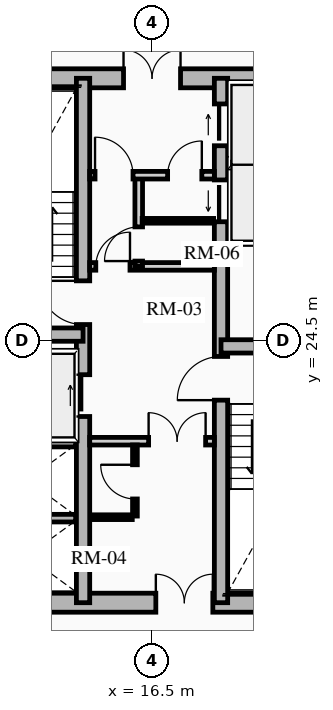
"""IFC4 building model, lengths in metres.
Left out: names, types, materials, properties, quantities, classifications, styles, units other than length and angle.
Written with IfcOpenShell. Run it as: python <this file> out.ifc"""

import sys

from ifc_helpers import new_model, si_unit, direction, frame, frame_2d, origin, place, context, subcontext, project, spatial, rectangle, extrude, source, transform, mapped, element, fill, save


model = new_model("IFC4")
c1 = context("Model", 3, precision=1e-05, world=origin(), true_north=direction((0.0, 1.0)))
c2 = subcontext(c1, "Body", "Model", "MODEL_VIEW")
j1 = project(units=[si_unit("LENGTHUNIT", "METRE"), si_unit("PLANEANGLEUNIT", "RADIAN")], contexts=[c1])
p1 = place(None, origin())
s1 = spatial("IfcSite", under=j1, at=p1, CompositionType="ELEMENT")
p2 = place(p1, origin())
s2 = spatial("IfcBuilding", under=s1, at=p2, CompositionType="ELEMENT")
p3 = place(p2, frame((0.0, 0.0, 33.64)))
s3 = spatial("IfcBuildingStorey", under=s2, at=p3, CompositionType="ELEMENT", Elevation=33.64)
p4 = place(p3, frame((11.15, 17.6, 0.0), z_axis=(0.0, 0.0, 1.0), x_axis=(1.0, 0.0, 0.0)))
e1 = element("IfcWall", 1, at=p4, inside=s3, PredefinedType="SHEAR", context=c2, shape_type="SweptSolid", body=[
    extrude(rectangle(XDim=10.7, YDim=0.5, at=frame_2d((5.35, 0.0))), origin(), (0.0, 0.0, 1.0), 2.91),
])
m1 = source(origin(), c2, "Body", "SweptSolid", [
    extrude(rectangle(XDim=1.5, YDim=2.02, at=frame_2d((0.75, 1.01))), frame((0.0, 0.26, 0.0), z_axis=(0.0, -1.0, 0.0), x_axis=(1.0, 0.0, 0.0)), (0.0, 0.0, 1.0), 0.52),
])
p5 = place(p4, frame((5.45, 0.0, 0.0)))
e2 = element("IfcOpeningElement", 2, at=p5, cuts=e1, PredefinedType="OPENING", context=c2, shape_type="MappedRepresentation", body=[
    mapped(m1, transform((0.0, 0.0, 0.0), x_axis=(1.0, 0.0, 0.0), y_axis=(0.0, 1.0, 0.0), z_axis=(0.0, 0.0, 1.0), scale=1.0)),
])
p6 = place(p3, frame((11.15, 31.4, 0.0), z_axis=(0.0, 0.0, 1.0), x_axis=(1.0, 0.0, 0.0)))
e3 = element("IfcWall", 3, at=p6, inside=s3, PredefinedType="SHEAR", context=c2, shape_type="SweptSolid", body=[
    extrude(rectangle(XDim=10.7, YDim=0.5, at=frame_2d((5.35, 0.0))), origin(), (0.0, 0.0, 1.0), 2.91),
])
p7 = place(p6, frame((4.6, 0.0, 0.0)))
e4 = element("IfcOpeningElement", 4, at=p7, cuts=e3, PredefinedType="OPENING", context=c2, shape_type="MappedRepresentation", body=[
    mapped(m1, transform((0.0, 0.0, 0.0), x_axis=(1.0, 0.0, 0.0), y_axis=(0.0, 1.0, 0.0), z_axis=(0.0, 0.0, 1.0), scale=1.0)),
])
p8 = place(p3, frame((14.685, 17.6, 0.0), z_axis=(0.0, 0.0, 1.0), x_axis=(0.0, 1.0, 0.0)))
e5 = element("IfcWall", 5, at=p8, inside=s3, PredefinedType="SHEAR", context=c2, shape_type="SweptSolid", body=[
    extrude(rectangle(XDim=13.8, YDim=0.35, at=frame_2d((6.9, 0.0))), origin(), (0.0, 0.0, 1.0), 2.91),
])
m2 = source(origin(), c2, "Body", "SweptSolid", [
    extrude(rectangle(XDim=1.1, YDim=2.015, at=frame_2d((0.55, 1.007))), frame((0.0, 0.185, 0.0), z_axis=(0.0, -1.0, 0.0), x_axis=(1.0, 0.0, 0.0)), (0.0, 0.0, 1.0), 0.37),
])
p9 = place(p8, frame((4.9, 0.0, 0.0)))
e6 = element("IfcOpeningElement", 6, at=p9, cuts=e5, PredefinedType="OPENING", context=c2, shape_type="MappedRepresentation", body=[
    mapped(m2, transform((0.0, 0.0, 0.0), x_axis=(1.0, 0.0, 0.0), y_axis=(0.0, 1.0, 0.0), z_axis=(0.0, 0.0, 1.0), scale=1.0)),
])
m3 = source(origin(), c2, "Body", "SweptSolid", [
    extrude(rectangle(XDim=1.15, YDim=2.02, at=frame_2d((0.575, 1.01))), frame((0.0, 0.185, 0.0), z_axis=(0.0, -1.0, 0.0), x_axis=(1.0, 0.0, 0.0)), (0.0, 0.0, 1.0), 0.37),
])
p10 = place(p8, frame((7.32, 0.0, 0.0)))
e7 = element("IfcOpeningElement", 7, at=p10, cuts=e5, PredefinedType="OPENING", context=c2, shape_type="MappedRepresentation", body=[
    mapped(m3, transform((0.0, 0.0, 0.0), x_axis=(1.0, 0.0, 0.0), y_axis=(0.0, 1.0, 0.0), z_axis=(0.0, 0.0, 1.0), scale=1.0)),
])
p11 = place(p3, frame((18.315, 17.6, 0.0), z_axis=(0.0, 0.0, 1.0), x_axis=(0.0, 1.0, 0.0)))
e8 = element("IfcWall", 8, at=p11, inside=s3, PredefinedType="SHEAR", context=c2, shape_type="SweptSolid", body=[
    extrude(rectangle(XDim=13.8, YDim=0.35, at=frame_2d((6.9, 0.0))), origin(), (0.0, 0.0, 1.0), 2.91),
])
p12 = place(p11, frame((10.025, 0.0, 0.0)))
e9 = element("IfcOpeningElement", 9, at=p12, cuts=e8, PredefinedType="OPENING", context=c2, shape_type="MappedRepresentation", body=[
    mapped(m2, transform((0.0, 0.0, 0.0), x_axis=(1.0, 0.0, 0.0), y_axis=(0.0, 1.0, 0.0), z_axis=(0.0, 0.0, 1.0), scale=1.0)),
])
p13 = place(p11, frame((12.025, 0.0, 0.0)))
e10 = element("IfcOpeningElement", 10, at=p13, cuts=e8, PredefinedType="OPENING", context=c2, shape_type="MappedRepresentation", body=[
    mapped(m2, transform((0.0, 0.0, 0.0), x_axis=(1.0, 0.0, 0.0), y_axis=(0.0, 1.0, 0.0), z_axis=(0.0, 0.0, 1.0), scale=1.0)),
])
p14 = place(p11, frame((5.33, 0.0, 0.0)))
e11 = element("IfcOpeningElement", 11, at=p14, cuts=e8, PredefinedType="OPENING", context=c2, shape_type="MappedRepresentation", body=[
    mapped(m3, transform((0.0, 0.0, 0.0), x_axis=(1.0, 0.0, 0.0), y_axis=(0.0, 1.0, 0.0), z_axis=(0.0, 0.0, 1.0), scale=1.0)),
])
for number, where, z_axis, x_axis in (
    (12, (11.4, 24.655, 0.0), (0.0, 0.0, 1.0), (1.0, 0.0, 0.0)),
    (13, (18.315, 24.345, 0.0), (0.0, 0.0, 1.0), (1.0, 0.0, 0.0)),
):
    element("IfcWall", number, at=place(p3, frame(where, z_axis=z_axis, x_axis=x_axis)), inside=s3, PredefinedType="SHEAR", context=c2, shape_type="SweptSolid", body=[
        extrude(rectangle(XDim=3.285, YDim=0.35, at=frame_2d((1.643, 0.0))), origin(), (0.0, 0.0, 1.0), 2.91),
    ])
for number, where, z_axis, x_axis in (
    (14, (11.52, 21.8, 0.0), (0.0, 0.0, 1.0), (1.0, 0.0, 0.0)),
    (15, (11.52, 19.825, 0.0), (0.0, 0.0, 1.0), (1.0, 0.0, 0.0)),
    (16, (18.51, 27.13, 0.0), (0.0, 0.0, 1.0), (1.0, 0.0, 0.0)),
    (17, (18.51, 29.175, 0.0), (0.0, 0.0, 1.0), (1.0, 0.0, 0.0)),
):
    element("IfcWall", number, at=place(p3, frame(where, z_axis=z_axis, x_axis=x_axis)), inside=s3, PredefinedType="SHEAR", context=c2, shape_type="SweptSolid", body=[
        extrude(rectangle(XDim=2.97, YDim=0.2, at=frame_2d((1.485, 0.0))), origin(), (0.0, 0.0, 1.0), 2.91),
    ])
p15 = place(p3, frame((14.86, 21.85, 0.0), z_axis=(0.0, 0.0, 1.0), x_axis=(1.0, 0.0, 0.0)))
e18 = element("IfcWall", 18, at=p15, inside=s3, PredefinedType="PARTITIONING", context=c2, shape_type="SweptSolid", body=[
    extrude(rectangle(XDim=3.28, YDim=0.2, at=frame_2d((1.64, 0.0))), origin(), (0.0, 0.0, 1.0), 2.635),
])
m4 = source(origin(), c2, "Body", "SweptSolid", [
    extrude(rectangle(XDim=1.5, YDim=2.02, at=frame_2d((0.75, 1.01))), frame((0.0, 0.11, 0.0), z_axis=(0.0, -1.0, 0.0), x_axis=(1.0, 0.0, 0.0)), (0.0, 0.0, 1.0), 0.22),
])
p16 = place(p15, frame((1.55, 0.0, 0.0)))
e19 = element("IfcOpeningElement", 19, at=p16, cuts=e18, PredefinedType="OPENING", context=c2, shape_type="MappedRepresentation", body=[
    mapped(m4, transform((0.0, 0.0, 0.0), x_axis=(1.0, 0.0, 0.0), y_axis=(0.0, 1.0, 0.0), z_axis=(0.0, 0.0, 1.0), scale=1.0)),
])
p17 = place(p3, frame((14.86, 26.45, 0.0), z_axis=(0.0, 0.0, 1.0), x_axis=(1.0, 0.0, 0.0)))
e20 = element("IfcWall", 20, at=p17, inside=s3, PredefinedType="PARTITIONING", context=c2, shape_type="SweptSolid", body=[
    extrude(rectangle(XDim=3.28, YDim=0.2, at=frame_2d((1.64, 0.0))), origin(), (0.0, 0.0, 1.0), 2.635),
])
m5 = source(origin(), c2, "Body", "SweptSolid", [
    extrude(rectangle(XDim=0.9, YDim=2.005, at=frame_2d((0.45, 1.002))), frame((0.0, 0.11, 0.0), z_axis=(0.0, -1.0, 0.0), x_axis=(1.0, 0.0, 0.0)), (0.0, 0.0, 1.0), 0.22),
])
p18 = place(p17, frame((0.16, 0.0, 0.0)))
e21 = element("IfcOpeningElement", 21, at=p18, cuts=e20, PredefinedType="OPENING", context=c2, shape_type="MappedRepresentation", body=[
    mapped(m5, transform((0.0, 0.0, 0.0), x_axis=(1.0, 0.0, 0.0), y_axis=(0.0, 1.0, 0.0), z_axis=(0.0, 0.0, 1.0), scale=1.0)),
])
p19 = place(p3, frame((16.15, 26.45, 0.0), z_axis=(0.0, 0.0, 1.0), x_axis=(0.0, 1.0, 0.0)))
e22 = element("IfcWall", 22, at=p19, inside=s3, PredefinedType="PARTITIONING", context=c2, shape_type="SweptSolid", body=[
    extrude(rectangle(XDim=2.4, YDim=0.2, at=frame_2d((1.2, 0.0))), origin(), (0.0, 0.0, 1.0), 2.635),
])
p20 = place(p19, frame((0.14, 0.0, 0.0)))
e23 = element("IfcOpeningElement", 23, at=p20, cuts=e22, PredefinedType="OPENING", context=c2, shape_type="MappedRepresentation", body=[
    mapped(m5, transform((0.0, 0.0, 0.0), x_axis=(1.0, 0.0, 0.0), y_axis=(0.0, 1.0, 0.0), z_axis=(0.0, 0.0, 1.0), scale=1.0)),
])
p21 = place(p3, frame((14.86, 28.85, 0.0), z_axis=(0.0, 0.0, 1.0), x_axis=(1.0, 0.0, 0.0)))
e24 = element("IfcWall", 24, at=p21, inside=s3, PredefinedType="PARTITIONING", context=c2, shape_type="SweptSolid", body=[
    extrude(rectangle(XDim=3.28, YDim=0.2, at=frame_2d((1.64, 0.0))), origin(), (0.0, 0.0, 1.0), 2.635),
])
m6 = source(origin(), c2, "Body", "SweptSolid", [
    extrude(rectangle(XDim=1.0, YDim=2.015, at=frame_2d((0.5, 1.007))), frame((0.0, 0.11, 0.0), z_axis=(0.0, -1.0, 0.0), x_axis=(1.0, 0.0, 0.0)), (0.0, 0.0, 1.0), 0.22),
])
p22 = place(p21, frame((0.14, 0.0, 0.0)))
e25 = element("IfcOpeningElement", 25, at=p22, cuts=e24, PredefinedType="OPENING", context=c2, shape_type="MappedRepresentation", body=[
    mapped(m6, transform((0.0, 0.0, 0.0), x_axis=(1.0, 0.0, 0.0), y_axis=(0.0, 1.0, 0.0), z_axis=(0.0, 0.0, 1.0), scale=1.0)),
])
p23 = place(p21, frame((2.05, 0.0, 0.0)))
e26 = element("IfcOpeningElement", 26, at=p23, cuts=e24, PredefinedType="OPENING", context=c2, shape_type="MappedRepresentation", body=[
    mapped(m5, transform((0.0, 0.0, 0.0), x_axis=(1.0, 0.0, 0.0), y_axis=(0.0, 1.0, 0.0), z_axis=(0.0, 0.0, 1.0), scale=1.0)),
])
p24 = place(p3, frame((16.05, 19.88, 0.0), z_axis=(0.0, 0.0, 1.0), x_axis=(0.0, 1.0, 0.0)))
e27 = element("IfcWall", 27, at=p24, inside=s3, PredefinedType="PARTITIONING", context=c2, shape_type="SweptSolid", body=[
    extrude(rectangle(XDim=1.87, YDim=0.125, at=frame_2d((0.935, 0.0))), origin(), (0.0, 0.0, 1.0), 2.635),
])
m7 = source(origin(), c2, "Body", "SweptSolid", [
    extrude(rectangle(XDim=0.9, YDim=2.005, at=frame_2d((0.45, 1.002))), frame((0.0, 0.073, 0.0), z_axis=(0.0, -1.0, 0.0), x_axis=(1.0, 0.0, 0.0)), (0.0, 0.0, 1.0), 0.145),
])
p25 = place(p24, frame((0.45, 0.0, 0.0)))
e28 = element("IfcOpeningElement", 28, at=p25, cuts=e27, PredefinedType="OPENING", context=c2, shape_type="MappedRepresentation", body=[
    mapped(m7, transform((0.0, 0.0, 0.0), x_axis=(1.0, 0.0, 0.0), y_axis=(0.0, 1.0, 0.0), z_axis=(0.0, 0.0, 1.0), scale=1.0)),
])
p26 = place(p3, frame((14.88, 19.85, 0.0), z_axis=(0.0, 0.0, 1.0), x_axis=(1.0, 0.0, 0.0)))
e29 = element("IfcWall", 29, at=p26, inside=s3, PredefinedType="PARTITIONING", context=c2, shape_type="SweptSolid", body=[
    extrude(rectangle(XDim=1.1, YDim=0.125, at=frame_2d((0.55, 0.0))), origin(), (0.0, 0.0, 1.0), 2.635),
])
p27 = place(p3, frame((16.24, 27.65, 0.0), z_axis=(0.0, 0.0, 1.0), x_axis=(1.0, 0.0, 0.0)))
e30 = element("IfcWall", 30, at=p27, inside=s3, PredefinedType="PARTITIONING", context=c2, shape_type="SweptSolid", body=[
    extrude(rectangle(XDim=1.88, YDim=0.125, at=frame_2d((0.94, 0.0))), origin(), (0.0, 0.0, 1.0), 2.635),
])
m8 = source(origin(), c2, "Body", "SweptSolid", [
    extrude(rectangle(XDim=1.1, YDim=2.015, at=frame_2d((0.55, 1.007))), frame((0.0, 0.025, 0.0), z_axis=(0.0, -1.0, 0.0), x_axis=(1.0, 0.0, 0.0)), (0.0, 0.0, 1.0), 0.05),
])
p28 = place(p9, origin())
e31 = element("IfcDoor", 31, at=p28, inside=s3, OperationType="SLIDING_TO_RIGHT", PredefinedType="DOOR", context=c2, shape_type="MappedRepresentation", body=[
    mapped(m8, transform((0.0, 0.0, 0.0), x_axis=(1.0, 0.0, 0.0), y_axis=(0.0, 1.0, 0.0), z_axis=(0.0, 0.0, 1.0), scale=1.0)),
])
fill(e6, e31)
p29 = place(p12, origin())
e32 = element("IfcDoor", 32, at=p29, inside=s3, OperationType="SLIDING_TO_LEFT", PredefinedType="DOOR", context=c2, shape_type="MappedRepresentation", body=[
    mapped(m8, transform((0.0, 0.0, 0.0), x_axis=(1.0, 0.0, 0.0), y_axis=(0.0, 1.0, 0.0), z_axis=(0.0, 0.0, 1.0), scale=1.0)),
])
fill(e9, e32)
p30 = place(p13, origin())
e33 = element("IfcDoor", 33, at=p30, inside=s3, OperationType="SLIDING_TO_RIGHT", PredefinedType="DOOR", context=c2, shape_type="MappedRepresentation", body=[
    mapped(m8, transform((0.0, 0.0, 0.0), x_axis=(1.0, 0.0, 0.0), y_axis=(0.0, 1.0, 0.0), z_axis=(0.0, 0.0, 1.0), scale=1.0)),
])
fill(e10, e33)
m9 = source(origin(), c2, "Body", "SweptSolid", [
    extrude(rectangle(XDim=1.15, YDim=2.02, at=frame_2d((0.575, 1.01))), frame((0.0, 0.025, 0.0), z_axis=(0.0, -1.0, 0.0), x_axis=(1.0, 0.0, 0.0)), (0.0, 0.0, 1.0), 0.05),
])
p31 = place(p10, origin())
e34 = element("IfcDoor", 34, at=p31, inside=s3, OperationType="SINGLE_SWING_RIGHT", PredefinedType="DOOR", context=c2, shape_type="MappedRepresentation", body=[
    mapped(m9, transform((0.0, 0.0, 0.0), x_axis=(1.0, 0.0, 0.0), y_axis=(0.0, 1.0, 0.0), z_axis=(0.0, 0.0, 1.0), scale=1.0)),
])
fill(e7, e34)
p32 = place(p14, origin())
e35 = element("IfcDoor", 35, at=p32, inside=s3, OperationType="SINGLE_SWING_LEFT", PredefinedType="DOOR", context=c2, shape_type="MappedRepresentation", body=[
    mapped(m9, transform((0.0, 0.0, 0.0), x_axis=(1.0, 0.0, 0.0), y_axis=(0.0, 1.0, 0.0), z_axis=(0.0, 0.0, 1.0), scale=1.0)),
])
fill(e11, e35)
m10 = source(origin(), c2, "Body", "SweptSolid", [
    extrude(rectangle(XDim=1.5, YDim=2.02, at=frame_2d((0.75, 1.01))), frame((0.0, 0.025, 0.0), z_axis=(0.0, -1.0, 0.0), x_axis=(1.0, 0.0, 0.0)), (0.0, 0.0, 1.0), 0.05),
])
p33 = place(p7, origin())
e36 = element("IfcDoor", 36, at=p33, inside=s3, OperationType="DOUBLE_DOOR_SINGLE_SWING", PredefinedType="DOOR", context=c2, shape_type="MappedRepresentation", body=[
    mapped(m10, transform((0.0, 0.0, 0.0), x_axis=(1.0, 0.0, 0.0), y_axis=(0.0, 1.0, 0.0), z_axis=(0.0, 0.0, 1.0), scale=1.0)),
])
fill(e4, e36)
p34 = place(p5, origin())
e37 = element("IfcDoor", 37, at=p34, inside=s3, OperationType="DOUBLE_DOOR_SINGLE_SWING", PredefinedType="DOOR", context=c2, shape_type="MappedRepresentation", body=[
    mapped(m10, transform((0.0, 0.0, 0.0), x_axis=(1.0, 0.0, 0.0), y_axis=(0.0, 1.0, 0.0), z_axis=(0.0, 0.0, 1.0), scale=1.0)),
])
fill(e2, e37)
p35 = place(p16, origin())
e38 = element("IfcDoor", 38, at=p35, inside=s3, OperationType="DOUBLE_DOOR_SINGLE_SWING", PredefinedType="DOOR", context=c2, shape_type="MappedRepresentation", body=[
    mapped(m10, transform((0.0, 0.0, 0.0), x_axis=(1.0, 0.0, 0.0), y_axis=(0.0, 1.0, 0.0), z_axis=(0.0, 0.0, 1.0), scale=1.0)),
])
fill(e19, e38)
m11 = source(origin(), c2, "Body", "SweptSolid", [
    extrude(rectangle(XDim=0.9, YDim=2.005, at=frame_2d((0.45, 1.002))), frame((0.0, 0.025, 0.0), z_axis=(0.0, -1.0, 0.0), x_axis=(1.0, 0.0, 0.0)), (0.0, 0.0, 1.0), 0.05),
])
p36 = place(p18, origin())
e39 = element("IfcDoor", 39, at=p36, inside=s3, OperationType="SINGLE_SWING_RIGHT", PredefinedType="DOOR", context=c2, shape_type="MappedRepresentation", body=[
    mapped(m11, transform((0.0, 0.0, 0.0), x_axis=(1.0, 0.0, 0.0), y_axis=(0.0, 1.0, 0.0), z_axis=(0.0, 0.0, 1.0), scale=1.0)),
])
fill(e21, e39)
m12 = source(origin(), c2, "Body", "SweptSolid", [
    extrude(rectangle(XDim=1.0, YDim=2.015, at=frame_2d((0.5, 1.007))), frame((0.0, 0.025, 0.0), z_axis=(0.0, -1.0, 0.0), x_axis=(1.0, 0.0, 0.0)), (0.0, 0.0, 1.0), 0.05),
])
p37 = place(p22, origin())
e40 = element("IfcDoor", 40, at=p37, inside=s3, OperationType="SINGLE_SWING_LEFT", PredefinedType="DOOR", context=c2, shape_type="MappedRepresentation", body=[
    mapped(m12, transform((0.0, 0.0, 0.0), x_axis=(1.0, 0.0, 0.0), y_axis=(0.0, 1.0, 0.0), z_axis=(0.0, 0.0, 1.0), scale=1.0)),
])
fill(e25, e40)
p38 = place(p25, origin())
e41 = element("IfcDoor", 41, at=p38, inside=s3, OperationType="SINGLE_SWING_RIGHT", PredefinedType="DOOR", context=c2, shape_type="MappedRepresentation", body=[
    mapped(m11, transform((0.0, 0.0, 0.0), x_axis=(1.0, 0.0, 0.0), y_axis=(0.0, 1.0, 0.0), z_axis=(0.0, 0.0, 1.0), scale=1.0)),
])
fill(e28, e41)
p39 = place(p20, origin())
e42 = element("IfcDoor", 42, at=p39, inside=s3, OperationType="SINGLE_SWING_LEFT", PredefinedType="DOOR", context=c2, shape_type="MappedRepresentation", body=[
    mapped(m11, transform((0.0, 0.0, 0.0), x_axis=(1.0, 0.0, 0.0), y_axis=(0.0, 1.0, 0.0), z_axis=(0.0, 0.0, 1.0), scale=1.0)),
])
fill(e23, e42)
p40 = place(p23, origin())
e43 = element("IfcDoor", 43, at=p40, inside=s3, OperationType="SINGLE_SWING_RIGHT", PredefinedType="DOOR", context=c2, shape_type="MappedRepresentation", body=[
    mapped(m11, transform((0.0, 0.0, 0.0), x_axis=(1.0, 0.0, 0.0), y_axis=(0.0, 1.0, 0.0), z_axis=(0.0, 0.0, 1.0), scale=1.0)),
])
fill(e26, e43)
save(model, sys.argv[1])
